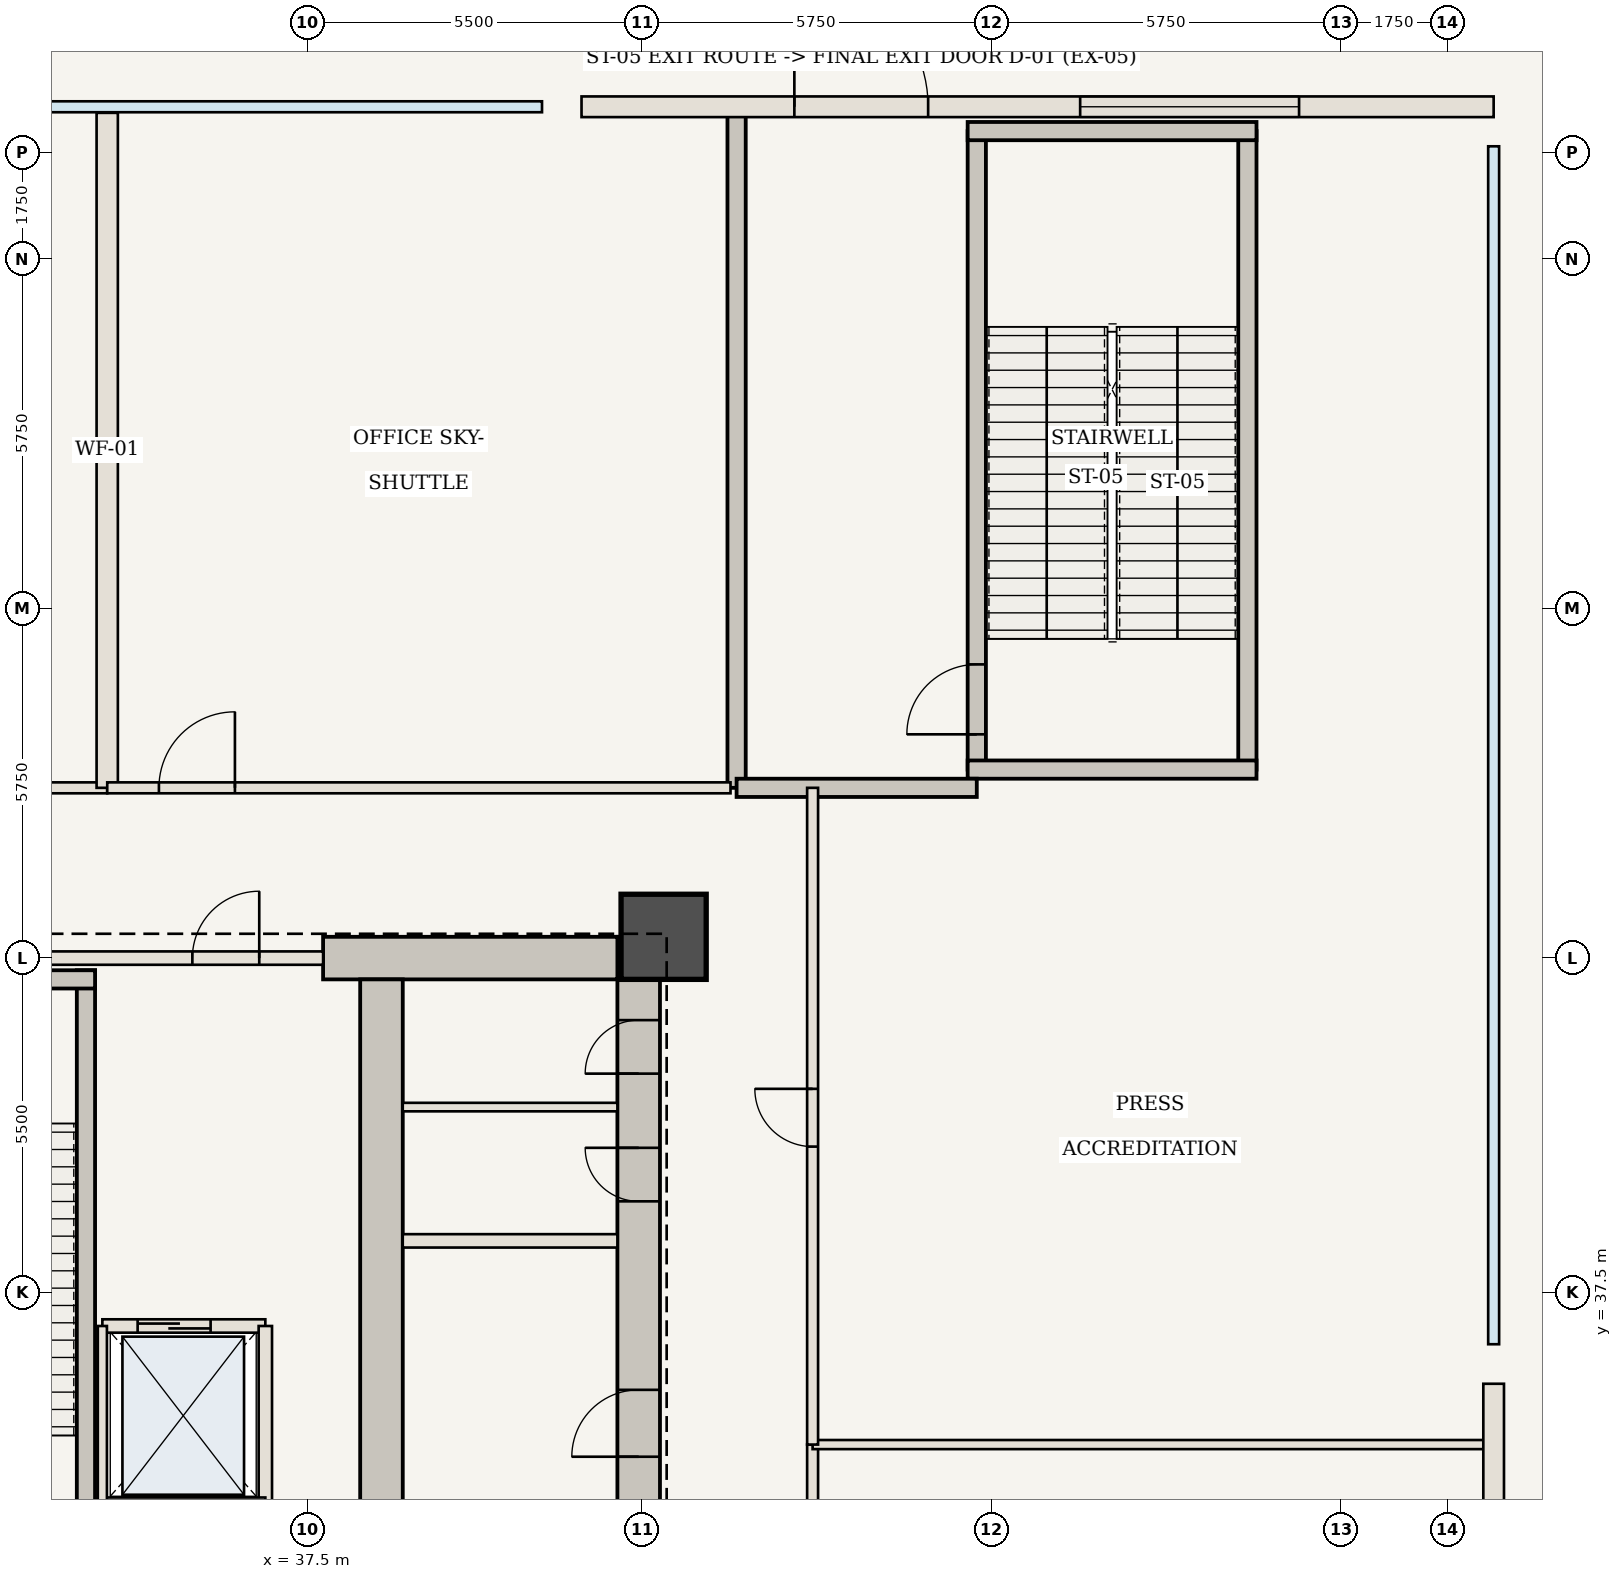
"""IFC4 building model, lengths in metres.
Left out: names, types, materials, properties, quantities, classifications, styles, units other than length and angle.
Written with IfcOpenShell. Run it as: python <this file> out.ifc"""

import sys

from ifc_helpers import new_model, si_unit, direction, frame, frame_2d, origin, origin_2d, place, context, subcontext, project, spatial, rectangle, extrude, element, fill, save


model = new_model("IFC4")
c1 = context("Model", 3, precision=1e-05, world=origin(), true_north=direction((0.0, 1.0)))
c2 = subcontext(c1, "Body", "Model", "MODEL_VIEW")
j1 = project(units=[si_unit("LENGTHUNIT", "METRE"), si_unit("PLANEANGLEUNIT", "RADIAN")], contexts=[c1])
p1 = place(None, origin())
s1 = spatial("IfcSite", under=j1, at=p1, CompositionType="ELEMENT")
p2 = place(p1, origin())
s2 = spatial("IfcBuilding", under=s1, at=p2, CompositionType="ELEMENT")
p3 = place(p2, origin())
s3 = spatial("IfcBuildingStorey", under=s2, at=p3, CompositionType="ELEMENT", Elevation=0.0)
p4 = place(p3, frame((42.94, 30.6, 0.0), z_axis=(0.0, 0.0, 1.0), x_axis=(0.0, 1.0, 0.0)))
e1 = element("IfcWall", 1, at=p4, inside=s3, PredefinedType="SHEAR", context=c2, shape_type="SweptSolid", body=[
    extrude(rectangle(XDim=12.75, YDim=0.7, at=frame_2d((6.375, 0.0))), origin(), (0.0, 0.0, 1.0), 6.65),
])
p5 = place(p4, frame((4.2, 0.0, 0.0)))
e2 = element("IfcOpeningElement", 2, at=p5, cuts=e1, PredefinedType="OPENING", context=c2, shape_type="SweptSolid", body=[
    extrude(rectangle(XDim=1.1, YDim=2.15, at=frame_2d((0.55, 1.075))), frame((0.0, 0.36, 0.0), z_axis=(0.0, -1.0, 0.0), x_axis=(1.0, 0.0, 0.0)), (0.0, 0.0, 1.0), 0.72),
])
p6 = place(p4, frame((8.4, 0.0, 0.0)))
e3 = element("IfcOpeningElement", 3, at=p6, cuts=e1, PredefinedType="OPENING", context=c2, shape_type="SweptSolid", body=[
    extrude(rectangle(XDim=0.88, YDim=2.1, at=frame_2d((0.44, 1.05))), frame((0.0, 0.36, 0.0), z_axis=(0.0, -1.0, 0.0), x_axis=(1.0, 0.0, 0.0)), (0.0, 0.0, 1.0), 0.72),
])
p7 = place(p4, frame((10.5, 0.0, 0.0)))
e4 = element("IfcOpeningElement", 4, at=p7, cuts=e1, PredefinedType="OPENING", context=c2, shape_type="SweptSolid", body=[
    extrude(rectangle(XDim=0.88, YDim=2.1, at=frame_2d((0.44, 1.05))), frame((0.0, 0.36, 0.0), z_axis=(0.0, -1.0, 0.0), x_axis=(1.0, 0.0, 0.0)), (0.0, 0.0, 1.0), 0.72),
])
p8 = place(p3, frame((37.75, 43.0, 0.0), z_axis=(0.0, 0.0, 1.0), x_axis=(1.0, 0.0, 0.0)))
e5 = element("IfcWall", 5, at=p8, inside=s3, PredefinedType="SHEAR", context=c2, shape_type="SweptSolid", body=[
    extrude(rectangle(XDim=4.84, YDim=0.7, at=frame_2d((2.42, 0.0))), origin(), (0.0, 0.0, 1.0), 6.65),
])
p9 = place(p3, frame((38.71, 30.6, 0.0), z_axis=(0.0, 0.0, 1.0), x_axis=(0.0, 1.0, 0.0)))
e6 = element("IfcWall", 6, at=p9, inside=s3, PredefinedType="SHEAR", context=c2, shape_type="SweptSolid", body=[
    extrude(rectangle(XDim=12.05, YDim=0.7, at=frame_2d((6.025, 0.0))), origin(), (0.0, 0.0, 1.0), 6.65),
])
p10 = place(p3, frame((43.35, 43.35, 0.0), z_axis=(0.0, 0.0, 1.0), x_axis=(1.0, 0.0, 0.0)))
e7 = element("IfcColumn", 7, at=p10, inside=s3, PredefinedType="COLUMN", context=c2, shape_type="SweptSolid", body=[
    extrude(rectangle(XDim=1.4, YDim=1.4, at=origin_2d()), origin(), (0.0, 0.0, 1.0), 6.65),
])
p11 = place(p3, frame((39.06, 38.35, 0.0), z_axis=(0.0, 0.0, 1.0), x_axis=(1.0, 0.0, 0.0)))
e8 = element("IfcWall", 8, at=p11, inside=s3, PredefinedType="STANDARD", context=c2, shape_type="SweptSolid", body=[
    extrude(rectangle(XDim=3.53, YDim=0.22, at=frame_2d((1.765, 0.0))), origin(), (0.0, 0.0, 1.0), 6.41),
])
p12 = place(p3, frame((39.06, 40.55, 0.0), z_axis=(0.0, 0.0, 1.0), x_axis=(1.0, 0.0, 0.0)))
e9 = element("IfcWall", 9, at=p12, inside=s3, PredefinedType="STANDARD", context=c2, shape_type="SweptSolid", body=[
    extrude(rectangle(XDim=3.53, YDim=0.14, at=frame_2d((1.765, 0.0))), origin(), (0.0, 0.0, 1.0), 6.41),
])
p13 = place(p3, frame((33.85, 33.2, 0.0), z_axis=(0.0, 0.0, 1.0), x_axis=(0.0, 1.0, 0.0)))
e10 = element("IfcWall", 10, at=p13, inside=s3, PredefinedType="SHEAR", context=c2, shape_type="SweptSolid", body=[
    extrude(rectangle(XDim=9.6, YDim=0.3, at=frame_2d((4.8, 0.0))), origin(), (0.0, 0.0, 1.0), 6.41),
])
p14 = place(p3, frame((29.95, 42.65, 0.0), z_axis=(0.0, 0.0, 1.0), x_axis=(1.0, 0.0, 0.0)))
e11 = element("IfcWall", 11, at=p14, inside=s3, PredefinedType="SHEAR", context=c2, shape_type="SweptSolid", body=[
    extrude(rectangle(XDim=4.05, YDim=0.3, at=frame_2d((2.025, 0.0))), origin(), (0.0, 0.0, 1.0), 6.41),
])
p15 = place(p3, frame((29.65, 43.0, 0.0), z_axis=(0.0, 0.0, 1.0), x_axis=(1.0, 0.0, 0.0)))
e12 = element("IfcWall", 12, at=p15, inside=s3, PredefinedType="STANDARD", context=c2, shape_type="SweptSolid", body=[
    extrude(rectangle(XDim=8.1, YDim=0.22, at=frame_2d((4.05, 0.0))), origin(), (0.0, 0.0, 1.0), 6.41),
])
p16 = place(p15, frame((5.95, 0.0, 0.0)))
e13 = element("IfcOpeningElement", 13, at=p16, cuts=e12, PredefinedType="OPENING", context=c2, shape_type="SweptSolid", body=[
    extrude(rectangle(XDim=1.1, YDim=2.15, at=frame_2d((0.55, 1.075))), frame((0.0, 0.12, 0.0), z_axis=(0.0, -1.0, 0.0), x_axis=(1.0, 0.0, 0.0)), (0.0, 0.0, 1.0), 0.24),
])
p17 = place(p3, frame((34.12, 36.95, 0.0), z_axis=(0.0, 0.0, 1.0), x_axis=(1.0, 0.0, 0.0)))
e14 = element("IfcWall", 14, at=p17, inside=s3, PredefinedType="STANDARD", context=c2, shape_type="SweptSolid", body=[
    extrude(rectangle(XDim=2.68, YDim=0.22, at=frame_2d((1.34, 0.0))), origin(), (0.0, 0.0, 1.0), 6.41),
])
p18 = place(p17, frame((0.58, 0.0, 0.0)))
e15 = element("IfcOpeningElement", 15, at=p18, cuts=e14, PredefinedType="OPENING", context=c2, shape_type="SweptSolid", body=[
    extrude(rectangle(XDim=1.2, YDim=2.2, at=frame_2d((0.6, 1.1))), frame((0.0, 0.12, 0.0), z_axis=(0.0, -1.0, 0.0), x_axis=(1.0, 0.0, 0.0)), (0.0, 0.0, 1.0), 0.24),
])
p19 = place(p3, frame((36.8, 34.02, 0.0), z_axis=(0.0, 0.0, 1.0), x_axis=(0.0, 1.0, 0.0)))
e16 = element("IfcWall", 16, at=p19, inside=s3, PredefinedType="STANDARD", context=c2, shape_type="SweptSolid", body=[
    extrude(rectangle(XDim=2.93, YDim=0.22, at=frame_2d((1.465, 0.0))), origin(), (0.0, 0.0, 1.0), 6.41),
])
p20 = place(p3, frame((34.12, 34.02, 0.0), z_axis=(0.0, 0.0, 1.0), x_axis=(1.0, 0.0, 0.0)))
e17 = element("IfcWall", 17, at=p20, inside=s3, PredefinedType="STANDARD", context=c2, shape_type="SweptSolid", body=[
    extrude(rectangle(XDim=2.68, YDim=0.22, at=frame_2d((1.34, 0.0))), origin(), (0.0, 0.0, 1.0), 6.41),
])
p21 = place(p3, frame((34.12, 34.02, 0.0), z_axis=(0.0, 0.0, 1.0), x_axis=(0.0, 1.0, 0.0)))
e18 = element("IfcWall", 18, at=p21, inside=s3, PredefinedType="STANDARD", context=c2, shape_type="SweptSolid", body=[
    extrude(rectangle(XDim=2.93, YDim=0.15, at=frame_2d((1.465, 0.0))), origin(), (0.0, 0.0, 1.0), 6.41),
])
p22 = place(p3, frame((48.5, 46.1, 0.0), z_axis=(0.0, 0.0, 1.0), x_axis=(0.0, 1.0, 0.0)))
e19 = element("IfcWall", 19, at=p22, inside=s3, PredefinedType="SHEAR", context=c2, shape_type="SweptSolid", body=[
    extrude(rectangle(XDim=10.5, YDim=0.3, at=frame_2d((5.25, 0.0))), origin(), (0.0, 0.0, 1.0), 6.41),
])
p23 = place(p22, frame((0.58, 0.0, 0.0)))
e20 = element("IfcOpeningElement", 20, at=p23, cuts=e19, PredefinedType="OPENING", context=c2, shape_type="SweptSolid", body=[
    extrude(rectangle(XDim=1.15, YDim=2.15, at=frame_2d((0.575, 1.075))), frame((0.0, 0.16, 0.0), z_axis=(0.0, -1.0, 0.0), x_axis=(1.0, 0.0, 0.0)), (0.0, 0.0, 1.0), 0.32),
])
p24 = place(p3, frame((52.95, 46.1, 0.0), z_axis=(0.0, 0.0, 1.0), x_axis=(0.0, 1.0, 0.0)))
e21 = element("IfcWall", 21, at=p24, inside=s3, PredefinedType="SHEAR", context=c2, shape_type="SweptSolid", body=[
    extrude(rectangle(XDim=10.5, YDim=0.3, at=frame_2d((5.25, 0.0))), origin(), (0.0, 0.0, 1.0), 6.41),
])
for number, where, z_axis, x_axis in (
    (22, (48.35, 46.1, 0.0), (0.0, 0.0, 1.0), (1.0, 0.0, 0.0)),
    (23, (48.35, 56.6, 0.0), (0.0, 0.0, 1.0), (1.0, 0.0, 0.0)),
):
    element("IfcWall", number, at=place(p3, frame(where, z_axis=z_axis, x_axis=x_axis)), inside=s3, PredefinedType="SHEAR", context=c2, shape_type="SweptSolid", body=[
        extrude(rectangle(XDim=4.75, YDim=0.3, at=frame_2d((2.375, 0.0))), origin(), (0.0, 0.0, 1.0), 6.41),
    ])
p25 = place(p3, frame((44.55, 45.8, 0.0), z_axis=(0.0, 0.0, 1.0), x_axis=(0.0, 1.0, 0.0)))
e24 = element("IfcWall", 24, at=p25, inside=s3, PredefinedType="SHEAR", context=c2, shape_type="SweptSolid", body=[
    extrude(rectangle(XDim=11.15, YDim=0.3, at=frame_2d((5.575, 0.0))), origin(), (0.0, 0.0, 1.0), 6.41),
])
p26 = place(p3, frame((44.55, 45.8, 0.0), z_axis=(0.0, 0.0, 1.0), x_axis=(1.0, 0.0, 0.0)))
e25 = element("IfcWall", 25, at=p26, inside=s3, PredefinedType="SHEAR", context=c2, shape_type="SweptSolid", body=[
    extrude(rectangle(XDim=3.95, YDim=0.3, at=frame_2d((1.975, 0.0))), origin(), (0.0, 0.0, 1.0), 6.41),
])
p27 = place(p3, frame((7.1, 45.8, 0.0), z_axis=(0.0, 0.0, 1.0), x_axis=(1.0, 0.0, 0.0)))
e26 = element("IfcWall", 26, at=p27, inside=s3, PredefinedType="STANDARD", context=c2, shape_type="SweptSolid", body=[
    extrude(rectangle(XDim=27.1, YDim=0.18, at=frame_2d((13.55, 0.0))), origin(), (0.0, 0.0, 1.0), 6.41),
])
p28 = place(p27, frame((23.55, 0.0, 0.0)))
e27 = element("IfcOpeningElement", 27, at=p28, cuts=e26, PredefinedType="OPENING", context=c2, shape_type="SweptSolid", body=[
    extrude(rectangle(XDim=1.25, YDim=2.2, at=frame_2d((0.625, 1.1))), frame((0.0, 0.1, 0.0), z_axis=(0.0, -1.0, 0.0), x_axis=(1.0, 0.0, 0.0)), (0.0, 0.0, 1.0), 0.2),
])
p29 = place(p3, frame((34.2, 45.8, 0.0), z_axis=(0.0, 0.0, 1.0), x_axis=(0.0, 1.0, 0.0)))
e28 = element("IfcWall", 28, at=p29, inside=s3, PredefinedType="STANDARD", context=c2, shape_type="SweptSolid", body=[
    extrude(rectangle(XDim=11.1, YDim=0.35, at=frame_2d((5.55, 0.0))), origin(), (0.0, 0.0, 1.0), 6.41),
])
p30 = place(p3, frame((34.2, 45.8, 0.0), z_axis=(0.0, 0.0, 1.0), x_axis=(1.0, 0.0, 0.0)))
e29 = element("IfcWall", 29, at=p30, inside=s3, PredefinedType="STANDARD", context=c2, shape_type="SweptSolid", body=[
    extrude(rectangle(XDim=10.25, YDim=0.18, at=frame_2d((5.125, 0.0))), origin(), (0.0, 0.0, 1.0), 6.41),
])
p31 = place(p30, frame((0.85, 0.0, 0.0)))
e30 = element("IfcOpeningElement", 30, at=p31, cuts=e29, PredefinedType="OPENING", context=c2, shape_type="SweptSolid", body=[
    extrude(rectangle(XDim=1.25, YDim=2.2, at=frame_2d((0.625, 1.1))), frame((0.0, 0.1, 0.0), z_axis=(0.0, -1.0, 0.0), x_axis=(1.0, 0.0, 0.0)), (0.0, 0.0, 1.0), 0.2),
])
p32 = place(p3, frame((45.8, 24.3, 0.0), z_axis=(0.0, 0.0, 1.0), x_axis=(0.0, 1.0, 0.0)))
e31 = element("IfcWall", 31, at=p32, inside=s3, PredefinedType="STANDARD", context=c2, shape_type="SweptSolid", body=[
    extrude(rectangle(XDim=10.7, YDim=0.18, at=frame_2d((5.35, 0.0))), origin(), (0.0, 0.0, 1.0), 6.41),
])
p33 = place(p32, frame((4.85, 0.0, 0.0)))
e32 = element("IfcOpeningElement", 32, at=p33, cuts=e31, PredefinedType="OPENING", context=c2, shape_type="SweptSolid", body=[
    extrude(rectangle(XDim=0.95, YDim=2.15, at=frame_2d((0.475, 1.075))), frame((0.0, 0.1, 0.0), z_axis=(0.0, -1.0, 0.0), x_axis=(1.0, 0.0, 0.0)), (0.0, 0.0, 1.0), 0.2),
])
p34 = place(p3, frame((45.8, 35.0, 0.0), z_axis=(0.0, 0.0, 1.0), x_axis=(1.0, 0.0, 0.0)))
e33 = element("IfcWall", 33, at=p34, inside=s3, PredefinedType="STANDARD", context=c2, shape_type="SweptSolid", body=[
    extrude(rectangle(XDim=11.1, YDim=0.15, at=frame_2d((5.55, 0.0))), origin(), (0.0, 0.0, 1.0), 6.41),
])
p35 = place(p3, frame((45.8, 35.0, 0.0), z_axis=(0.0, 0.0, 1.0), x_axis=(0.0, 1.0, 0.0)))
e34 = element("IfcWall", 34, at=p35, inside=s3, PredefinedType="STANDARD", context=c2, shape_type="SweptSolid", body=[
    extrude(rectangle(XDim=10.8, YDim=0.18, at=frame_2d((5.4, 0.0))), origin(), (0.0, 0.0, 1.0), 6.41),
])
p36 = place(p35, frame((4.9, 0.0, 0.0)))
e35 = element("IfcOpeningElement", 35, at=p36, cuts=e34, PredefinedType="OPENING", context=c2, shape_type="SweptSolid", body=[
    extrude(rectangle(XDim=0.95, YDim=2.15, at=frame_2d((0.475, 1.075))), frame((0.0, 0.1, 0.0), z_axis=(0.0, -1.0, 0.0), x_axis=(1.0, 0.0, 0.0)), (0.0, 0.0, 1.0), 0.2),
])
p37 = place(p3, frame((42.0, 57.0, 0.0), z_axis=(0.0, 0.0, 1.0), x_axis=(1.0, 0.0, 0.0)))
e36 = element("IfcWall", 36, at=p37, inside=s3, PredefinedType="USERDEFINED", context=c2, shape_type="SweptSolid", body=[
    extrude(rectangle(XDim=15.0, YDim=0.34, at=frame_2d((7.5, 0.0))), origin(), (0.0, 0.0, 1.0), 5.51),
])
p38 = place(p37, frame((3.5, 0.0, 0.0)))
e37 = element("IfcOpeningElement", 37, at=p38, cuts=e36, PredefinedType="OPENING", context=c2, shape_type="SweptSolid", body=[
    extrude(rectangle(XDim=2.2, YDim=2.4, at=frame_2d((1.1, 1.2))), frame((0.0, 0.18, 0.0), z_axis=(0.0, -1.0, 0.0), x_axis=(1.0, 0.0, 0.0)), (0.0, 0.0, 1.0), 0.36),
])
p39 = place(p37, frame((8.2, 0.0, 0.9)))
e38 = element("IfcOpeningElement", 38, at=p39, cuts=e36, PredefinedType="OPENING", context=c2, shape_type="SweptSolid", body=[
    extrude(rectangle(XDim=3.6, YDim=2.6, at=frame_2d((1.8, 1.3))), frame((0.0, 0.18, 0.0), z_axis=(0.0, -1.0, 0.0), x_axis=(1.0, 0.0, 0.0)), (0.0, 0.0, 1.0), 0.36),
])
p40 = place(p3, frame((57.0, 36.0, 0.0), z_axis=(0.0, 0.0, 1.0), x_axis=(0.0, -1.0, 0.0)))
e39 = element("IfcWall", 39, at=p40, inside=s3, PredefinedType="USERDEFINED", context=c2, shape_type="SweptSolid", body=[
    extrude(rectangle(XDim=29.0, YDim=0.34, at=frame_2d((14.5, 0.0))), origin(), (0.0, 0.0, 1.0), 5.51),
])
p41 = place(p40, frame((12.4, 0.0, 0.0)))
e40 = element("IfcOpeningElement", 40, at=p41, cuts=e39, PredefinedType="OPENING", context=c2, shape_type="SweptSolid", body=[
    extrude(rectangle(XDim=2.2, YDim=2.4, at=frame_2d((1.1, 1.2))), frame((0.0, 0.18, 0.0), z_axis=(0.0, -1.0, 0.0), x_axis=(1.0, 0.0, 0.0)), (0.0, 0.0, 1.0), 0.36),
])
p42 = place(p40, frame((4.2, 0.0, 0.9)))
e41 = element("IfcOpeningElement", 41, at=p42, cuts=e39, PredefinedType="OPENING", context=c2, shape_type="SweptSolid", body=[
    extrude(rectangle(XDim=3.6, YDim=2.6, at=frame_2d((1.8, 1.3))), frame((0.0, 0.18, 0.0), z_axis=(0.0, -1.0, 0.0), x_axis=(1.0, 0.0, 0.0)), (0.0, 0.0, 1.0), 0.36),
])
p43 = place(p5, origin())
e42 = element("IfcDoor", 42, at=p43, inside=s3, OperationType="SINGLE_SWING_LEFT", PredefinedType="DOOR", context=c2, shape_type="SweptSolid", body=[
    extrude(rectangle(XDim=1.1, YDim=2.15, at=frame_2d((0.55, 1.075))), frame((0.0, 0.025, 0.0), z_axis=(0.0, -1.0, 0.0), x_axis=(1.0, 0.0, 0.0)), (0.0, 0.0, 1.0), 0.05),
])
fill(e2, e42)
p44 = place(p6, origin())
e43 = element("IfcDoor", 43, at=p44, inside=s3, OperationType="SINGLE_SWING_RIGHT", PredefinedType="DOOR", context=c2, shape_type="SweptSolid", body=[
    extrude(rectangle(XDim=0.88, YDim=2.1, at=frame_2d((0.44, 1.05))), frame((0.0, 0.025, 0.0), z_axis=(0.0, -1.0, 0.0), x_axis=(1.0, 0.0, 0.0)), (0.0, 0.0, 1.0), 0.05),
])
fill(e3, e43)
p45 = place(p7, origin())
e44 = element("IfcDoor", 44, at=p45, inside=s3, OperationType="SINGLE_SWING_LEFT", PredefinedType="DOOR", context=c2, shape_type="SweptSolid", body=[
    extrude(rectangle(XDim=0.88, YDim=2.1, at=frame_2d((0.44, 1.05))), frame((0.0, 0.025, 0.0), z_axis=(0.0, -1.0, 0.0), x_axis=(1.0, 0.0, 0.0)), (0.0, 0.0, 1.0), 0.05),
])
fill(e4, e44)
p46 = place(p16, origin())
e45 = element("IfcDoor", 45, at=p46, inside=s3, OperationType="SINGLE_SWING_RIGHT", PredefinedType="DOOR", context=c2, shape_type="SweptSolid", body=[
    extrude(rectangle(XDim=1.1, YDim=2.15, at=frame_2d((0.55, 1.075))), frame((0.0, 0.025, 0.0), z_axis=(0.0, -1.0, 0.0), x_axis=(1.0, 0.0, 0.0)), (0.0, 0.0, 1.0), 0.05),
])
fill(e13, e45)
p47 = place(p18, origin())
e46 = element("IfcDoor", 46, at=p47, inside=s3, OperationType="DOUBLE_DOOR_SLIDING", PredefinedType="DOOR", context=c2, shape_type="SweptSolid", body=[
    extrude(rectangle(XDim=1.2, YDim=2.2, at=frame_2d((0.6, 1.1))), frame((0.0, 0.025, 0.0), z_axis=(0.0, -1.0, 0.0), x_axis=(1.0, 0.0, 0.0)), (0.0, 0.0, 1.0), 0.05),
])
fill(e15, e46)
p48 = place(p23, origin())
e47 = element("IfcDoor", 47, at=p48, inside=s3, OperationType="SINGLE_SWING_LEFT", PredefinedType="DOOR", context=c2, shape_type="SweptSolid", body=[
    extrude(rectangle(XDim=1.15, YDim=2.15, at=frame_2d((0.575, 1.075))), frame((0.0, 0.025, 0.0), z_axis=(0.0, -1.0, 0.0), x_axis=(1.0, 0.0, 0.0)), (0.0, 0.0, 1.0), 0.05),
])
fill(e20, e47)
p49 = place(p31, origin())
e48 = element("IfcDoor", 48, at=p49, inside=s3, OperationType="SINGLE_SWING_RIGHT", PredefinedType="DOOR", context=c2, shape_type="SweptSolid", body=[
    extrude(rectangle(XDim=1.25, YDim=2.2, at=frame_2d((0.625, 1.1))), frame((0.0, 0.025, 0.0), z_axis=(0.0, -1.0, 0.0), x_axis=(1.0, 0.0, 0.0)), (0.0, 0.0, 1.0), 0.05),
])
fill(e30, e48)
p50 = place(p36, origin())
e49 = element("IfcDoor", 49, at=p50, inside=s3, OperationType="SINGLE_SWING_RIGHT", PredefinedType="DOOR", context=c2, shape_type="SweptSolid", body=[
    extrude(rectangle(XDim=0.95, YDim=2.15, at=frame_2d((0.475, 1.075))), frame((0.0, 0.025, 0.0), z_axis=(0.0, -1.0, 0.0), x_axis=(1.0, 0.0, 0.0)), (0.0, 0.0, 1.0), 0.05),
])
fill(e35, e49)
p51 = place(p38, origin())
e50 = element("IfcDoor", 50, at=p51, inside=s3, OperationType="DOUBLE_DOOR_SINGLE_SWING", PredefinedType="DOOR", context=c2, shape_type="SweptSolid", body=[
    extrude(rectangle(XDim=2.2, YDim=2.4, at=frame_2d((1.1, 1.2))), frame((0.0, 0.025, 0.0), z_axis=(0.0, -1.0, 0.0), x_axis=(1.0, 0.0, 0.0)), (0.0, 0.0, 1.0), 0.05),
])
fill(e37, e50)
p52 = place(p39, origin())
e51 = element("IfcWindow", 51, at=p52, inside=s3, PartitioningType="SINGLE_PANEL", PredefinedType="WINDOW", context=c2, shape_type="SweptSolid", body=[
    extrude(rectangle(XDim=3.6, YDim=2.6, at=frame_2d((1.8, 1.3))), frame((0.0, 0.03, 0.0), z_axis=(0.0, -1.0, 0.0), x_axis=(1.0, 0.0, 0.0)), (0.0, 0.0, 1.0), 0.06),
])
fill(e38, e51)
save(model, sys.argv[1])
